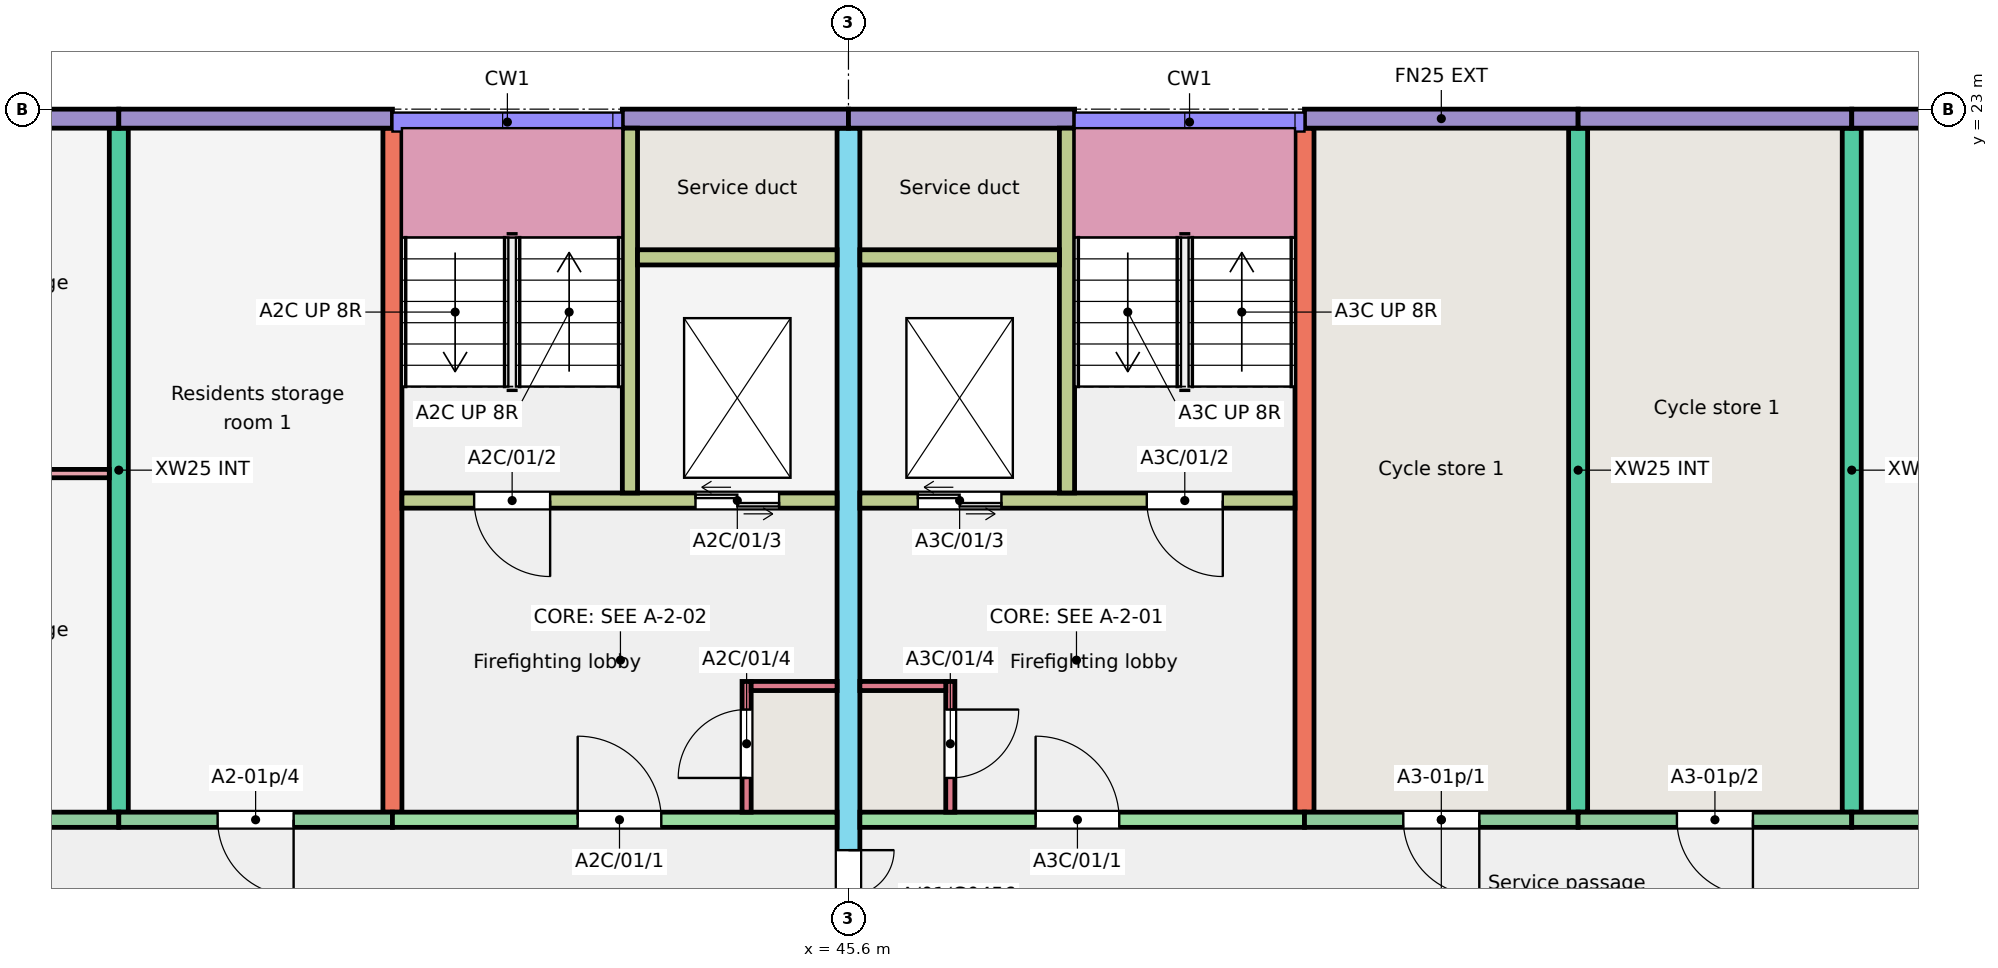
"""IFC4 building model, lengths in metres.
Left out: names, types, materials, properties, quantities, classifications, styles, units other than length and angle.
Written with IfcOpenShell. Run it as: python <this file> out.ifc"""

import sys

from ifc_helpers import new_model, si_unit, direction, frame, frame_2d, origin, place, context, subcontext, project, spatial, rectangle, extrude, element, fill, save


model = new_model("IFC4")
c1 = context("Model", 3, precision=1e-05, world=origin(), true_north=direction((0.0, 1.0)))
c2 = subcontext(c1, "Body", "Model", "MODEL_VIEW")
j1 = project(units=[si_unit("LENGTHUNIT", "METRE"), si_unit("PLANEANGLEUNIT", "RADIAN")], contexts=[c1])
p1 = place(None, origin())
s1 = spatial("IfcSite", under=j1, at=p1, CompositionType="ELEMENT")
p2 = place(p1, origin())
s2 = spatial("IfcBuilding", under=s1, at=p2, CompositionType="ELEMENT")
p3 = place(p2, frame((0.0, 0.0, 3.0)))
s3 = spatial("IfcBuildingStorey", under=s2, at=p3, CompositionType="ELEMENT", Elevation=3.0)
for number, where, z_axis, x_axis in (
    (1, (36.0, 13.75, 0.0), (0.0, 0.0, 1.0), (0.0, 1.0, 0.0)),
    (2, (39.6, 13.75, 0.0), (0.0, 0.0, 1.0), (0.0, 1.0, 0.0)),
):
    element("IfcWall", number, at=place(p3, frame(where, z_axis=z_axis, x_axis=x_axis)), inside=s3, PredefinedType="SHEAR", context=c2, shape_type="SweptSolid", body=[
        extrude(rectangle(XDim=9.0, YDim=0.25, at=frame_2d((4.5, 0.0))), origin(), (0.0, 0.0, 1.0), 3.0),
    ])
p4 = place(p3, frame((45.6, 11.75, 0.0), z_axis=(0.0, 0.0, 1.0), x_axis=(0.0, 1.0, 0.0)))
e3 = element("IfcWall", 3, at=p4, inside=s3, PredefinedType="SHEAR", context=c2, shape_type="SweptSolid", body=[
    extrude(rectangle(XDim=11.0, YDim=0.3, at=frame_2d((5.5, 0.0))), origin(), (0.0, 0.0, 1.0), 3.0),
])
p5 = place(p4, frame((0.3, 0.0, 0.0)))
e4 = element("IfcOpeningElement", 4, at=p5, cuts=e3, PredefinedType="OPENING", context=c2, shape_type="SweptSolid", body=[
    extrude(rectangle(XDim=1.2, YDim=2.1, at=frame_2d((0.6, 1.05))), frame((0.0, 0.16, 0.0), z_axis=(0.0, -1.0, 0.0), x_axis=(1.0, 0.0, 0.0)), (0.0, 0.0, 1.0), 0.32),
])
for number, where, z_axis, x_axis in (
    (5, (51.6, 13.75, 0.0), (0.0, 0.0, 1.0), (0.0, 1.0, 0.0)),
    (6, (55.2, 13.75, 0.0), (0.0, 0.0, 1.0), (0.0, 1.0, 0.0)),
    (7, (58.8, 13.75, 0.0), (0.0, 0.0, 1.0), (0.0, 1.0, 0.0)),
):
    element("IfcWall", number, at=place(p3, frame(where, z_axis=z_axis, x_axis=x_axis)), inside=s3, PredefinedType="SHEAR", context=c2, shape_type="SweptSolid", body=[
        extrude(rectangle(XDim=9.0, YDim=0.25, at=frame_2d((4.5, 0.0))), origin(), (0.0, 0.0, 1.0), 3.0),
    ])
p6 = place(p3, frame((32.4, 22.875, 0.0), z_axis=(0.0, 0.0, 1.0), x_axis=(1.0, 0.0, 0.0)))
e8 = element("IfcWall", 8, at=p6, inside=s3, PredefinedType="SOLIDWALL", context=c2, shape_type="SweptSolid", body=[
    extrude(rectangle(XDim=3.6, YDim=0.25, at=frame_2d((1.8, 0.0))), origin(), (0.0, 0.0, 1.0), 3.0),
])
p7 = place(p3, frame((32.4, 13.65, 0.0), z_axis=(0.0, 0.0, 1.0), x_axis=(1.0, 0.0, 0.0)))
e9 = element("IfcWall", 9, at=p7, inside=s3, PredefinedType="SOLIDWALL", context=c2, shape_type="SweptSolid", body=[
    extrude(rectangle(XDim=3.6, YDim=0.2, at=frame_2d((1.8, 0.0))), origin(), (0.0, 0.0, 1.0), 3.0),
])
p8 = place(p7, frame((1.3, 0.0, 0.0)))
e10 = element("IfcOpeningElement", 10, at=p8, cuts=e9, PredefinedType="OPENING", context=c2, shape_type="SweptSolid", body=[
    extrude(rectangle(XDim=1.0, YDim=2.1, at=frame_2d((0.5, 1.05))), frame((0.0, 0.11, 0.0), z_axis=(0.0, -1.0, 0.0), x_axis=(1.0, 0.0, 0.0)), (0.0, 0.0, 1.0), 0.22),
])
p9 = place(p3, frame((36.0, 22.875, 0.0), z_axis=(0.0, 0.0, 1.0), x_axis=(1.0, 0.0, 0.0)))
e11 = element("IfcWall", 11, at=p9, inside=s3, PredefinedType="SOLIDWALL", context=c2, shape_type="SweptSolid", body=[
    extrude(rectangle(XDim=3.6, YDim=0.25, at=frame_2d((1.8, 0.0))), origin(), (0.0, 0.0, 1.0), 3.0),
])
p10 = place(p3, frame((36.0, 13.65, 0.0), z_axis=(0.0, 0.0, 1.0), x_axis=(1.0, 0.0, 0.0)))
e12 = element("IfcWall", 12, at=p10, inside=s3, PredefinedType="SOLIDWALL", context=c2, shape_type="SweptSolid", body=[
    extrude(rectangle(XDim=3.6, YDim=0.2, at=frame_2d((1.8, 0.0))), origin(), (0.0, 0.0, 1.0), 3.0),
])
p11 = place(p10, frame((1.3, 0.0, 0.0)))
e13 = element("IfcOpeningElement", 13, at=p11, cuts=e12, PredefinedType="OPENING", context=c2, shape_type="SweptSolid", body=[
    extrude(rectangle(XDim=1.0, YDim=2.1, at=frame_2d((0.5, 1.05))), frame((0.0, 0.11, 0.0), z_axis=(0.0, -1.0, 0.0), x_axis=(1.0, 0.0, 0.0)), (0.0, 0.0, 1.0), 0.22),
])
p12 = place(p3, frame((42.625, 22.875, 0.0), z_axis=(0.0, 0.0, 1.0), x_axis=(1.0, 0.0, 0.0)))
e14 = element("IfcWall", 14, at=p12, inside=s3, PredefinedType="SOLIDWALL", context=c2, shape_type="SweptSolid", body=[
    extrude(rectangle(XDim=2.975, YDim=0.25, at=frame_2d((1.488, 0.0))), origin(), (0.0, 0.0, 1.0), 3.0),
])
p13 = place(p3, frame((39.6, 13.65, 0.0), z_axis=(0.0, 0.0, 1.0), x_axis=(1.0, 0.0, 0.0)))
e15 = element("IfcWall", 15, at=p13, inside=s3, PredefinedType="SHEAR", context=c2, shape_type="SweptSolid", body=[
    extrude(rectangle(XDim=5.85, YDim=0.2, at=frame_2d((2.925, 0.0))), origin(), (0.0, 0.0, 1.0), 3.0),
])
p14 = place(p13, frame((2.438, 0.0, 0.0)))
e16 = element("IfcOpeningElement", 16, at=p14, cuts=e15, PredefinedType="OPENING", context=c2, shape_type="SweptSolid", body=[
    extrude(rectangle(XDim=1.1, YDim=2.1, at=frame_2d((0.55, 1.05))), frame((0.0, 0.11, 0.0), z_axis=(0.0, -1.0, 0.0), x_axis=(1.0, 0.0, 0.0)), (0.0, 0.0, 1.0), 0.22),
])
p15 = place(p3, frame((39.725, 17.85, 0.0), z_axis=(0.0, 0.0, 1.0), x_axis=(1.0, 0.0, 0.0)))
e17 = element("IfcWall", 17, at=p15, inside=s3, PredefinedType="SHEAR", context=c2, shape_type="SweptSolid", body=[
    extrude(rectangle(XDim=5.725, YDim=0.2, at=frame_2d((2.862, 0.0))), origin(), (0.0, 0.0, 1.0), 3.0),
])
p16 = place(p15, frame((0.95, 0.0, 0.0)))
e18 = element("IfcOpeningElement", 18, at=p16, cuts=e17, PredefinedType="OPENING", context=c2, shape_type="SweptSolid", body=[
    extrude(rectangle(XDim=1.0, YDim=2.1, at=frame_2d((0.5, 1.05))), frame((0.0, 0.11, 0.0), z_axis=(0.0, -1.0, 0.0), x_axis=(1.0, 0.0, 0.0)), (0.0, 0.0, 1.0), 0.22),
])
p17 = place(p15, frame((3.863, 0.0, 0.0)))
e19 = element("IfcOpeningElement", 19, at=p17, cuts=e17, PredefinedType="OPENING", context=c2, shape_type="SweptSolid", body=[
    extrude(rectangle(XDim=1.1, YDim=2.1, at=frame_2d((0.55, 1.05))), frame((0.0, 0.11, 0.0), z_axis=(0.0, -1.0, 0.0), x_axis=(1.0, 0.0, 0.0)), (0.0, 0.0, 1.0), 0.22),
])
p18 = place(p3, frame((42.725, 17.95, 0.0), z_axis=(0.0, 0.0, 1.0), x_axis=(0.0, 1.0, 0.0)))
e20 = element("IfcWall", 20, at=p18, inside=s3, PredefinedType="SHEAR", context=c2, shape_type="SweptSolid", body=[
    extrude(rectangle(XDim=4.8, YDim=0.2, at=frame_2d((2.4, 0.0))), origin(), (0.0, 0.0, 1.0), 3.0),
])
p19 = place(p3, frame((42.825, 21.05, 0.0), z_axis=(0.0, 0.0, 1.0), x_axis=(1.0, 0.0, 0.0)))
e21 = element("IfcWall", 21, at=p19, inside=s3, PredefinedType="SHEAR", context=c2, shape_type="SweptSolid", body=[
    extrude(rectangle(XDim=2.625, YDim=0.2, at=frame_2d((1.312, 0.0))), origin(), (0.0, 0.0, 1.0), 3.0),
])
p20 = place(p3, frame((44.26, 13.75, 0.0), z_axis=(0.0, 0.0, 1.0), x_axis=(0.0, 1.0, 0.0)))
e22 = element("IfcWall", 22, at=p20, inside=s3, PredefinedType="SHEAR", context=c2, shape_type="SweptSolid", body=[
    extrude(rectangle(XDim=1.72, YDim=0.12, at=frame_2d((0.86, 0.0))), origin(), (0.0, 0.0, 1.0), 3.0),
])
p21 = place(p20, frame((0.45, 0.0, 0.0)))
e23 = element("IfcOpeningElement", 23, at=p21, cuts=e22, PredefinedType="OPENING", context=c2, shape_type="SweptSolid", body=[
    extrude(rectangle(XDim=0.9, YDim=2.1, at=frame_2d((0.45, 1.05))), frame((0.0, 0.07, 0.0), z_axis=(0.0, -1.0, 0.0), x_axis=(1.0, 0.0, 0.0)), (0.0, 0.0, 1.0), 0.14),
])
p22 = place(p3, frame((44.32, 15.41, 0.0), z_axis=(0.0, 0.0, 1.0), x_axis=(1.0, 0.0, 0.0)))
e24 = element("IfcWall", 24, at=p22, inside=s3, PredefinedType="SHEAR", context=c2, shape_type="SweptSolid", body=[
    extrude(rectangle(XDim=1.13, YDim=0.12, at=frame_2d((0.565, 0.0))), origin(), (0.0, 0.0, 1.0), 3.0),
])
p23 = place(p3, frame((45.6, 22.875, 0.0), z_axis=(0.0, 0.0, 1.0), x_axis=(1.0, 0.0, 0.0)))
e25 = element("IfcWall", 25, at=p23, inside=s3, PredefinedType="SOLIDWALL", context=c2, shape_type="SweptSolid", body=[
    extrude(rectangle(XDim=2.975, YDim=0.25, at=frame_2d((1.487, 0.0))), origin(), (0.0, 0.0, 1.0), 3.0),
])
p24 = place(p3, frame((45.75, 13.65, 0.0), z_axis=(0.0, 0.0, 1.0), x_axis=(1.0, 0.0, 0.0)))
e26 = element("IfcWall", 26, at=p24, inside=s3, PredefinedType="SHEAR", context=c2, shape_type="SweptSolid", body=[
    extrude(rectangle(XDim=5.85, YDim=0.2, at=frame_2d((2.925, 0.0))), origin(), (0.0, 0.0, 1.0), 3.0),
])
p25 = place(p24, frame((2.312, 0.0, 0.0)))
e27 = element("IfcOpeningElement", 27, at=p25, cuts=e26, PredefinedType="OPENING", context=c2, shape_type="SweptSolid", body=[
    extrude(rectangle(XDim=1.1, YDim=2.1, at=frame_2d((0.55, 1.05))), frame((0.0, 0.11, 0.0), z_axis=(0.0, -1.0, 0.0), x_axis=(1.0, 0.0, 0.0)), (0.0, 0.0, 1.0), 0.22),
])
p26 = place(p3, frame((45.75, 17.85, 0.0), z_axis=(0.0, 0.0, 1.0), x_axis=(1.0, 0.0, 0.0)))
e28 = element("IfcWall", 28, at=p26, inside=s3, PredefinedType="SHEAR", context=c2, shape_type="SweptSolid", body=[
    extrude(rectangle(XDim=5.725, YDim=0.2, at=frame_2d((2.863, 0.0))), origin(), (0.0, 0.0, 1.0), 3.0),
])
p27 = place(p26, frame((3.775, 0.0, 0.0)))
e29 = element("IfcOpeningElement", 29, at=p27, cuts=e28, PredefinedType="OPENING", context=c2, shape_type="SweptSolid", body=[
    extrude(rectangle(XDim=1.0, YDim=2.1, at=frame_2d((0.5, 1.05))), frame((0.0, 0.11, 0.0), z_axis=(0.0, -1.0, 0.0), x_axis=(1.0, 0.0, 0.0)), (0.0, 0.0, 1.0), 0.22),
])
p28 = place(p26, frame((0.762, 0.0, 0.0)))
e30 = element("IfcOpeningElement", 30, at=p28, cuts=e28, PredefinedType="OPENING", context=c2, shape_type="SweptSolid", body=[
    extrude(rectangle(XDim=1.1, YDim=2.1, at=frame_2d((0.55, 1.05))), frame((0.0, 0.11, 0.0), z_axis=(0.0, -1.0, 0.0), x_axis=(1.0, 0.0, 0.0)), (0.0, 0.0, 1.0), 0.22),
])
p29 = place(p3, frame((48.475, 17.95, 0.0), z_axis=(0.0, 0.0, 1.0), x_axis=(0.0, 1.0, 0.0)))
e31 = element("IfcWall", 31, at=p29, inside=s3, PredefinedType="SHEAR", context=c2, shape_type="SweptSolid", body=[
    extrude(rectangle(XDim=4.8, YDim=0.2, at=frame_2d((2.4, 0.0))), origin(), (0.0, 0.0, 1.0), 3.0),
])
p30 = place(p3, frame((45.75, 21.05, 0.0), z_axis=(0.0, 0.0, 1.0), x_axis=(1.0, 0.0, 0.0)))
e32 = element("IfcWall", 32, at=p30, inside=s3, PredefinedType="SHEAR", context=c2, shape_type="SweptSolid", body=[
    extrude(rectangle(XDim=2.625, YDim=0.2, at=frame_2d((1.312, 0.0))), origin(), (0.0, 0.0, 1.0), 3.0),
])
p31 = place(p3, frame((46.94, 13.75, 0.0), z_axis=(0.0, 0.0, 1.0), x_axis=(0.0, 1.0, 0.0)))
e33 = element("IfcWall", 33, at=p31, inside=s3, PredefinedType="SHEAR", context=c2, shape_type="SweptSolid", body=[
    extrude(rectangle(XDim=1.72, YDim=0.12, at=frame_2d((0.86, 0.0))), origin(), (0.0, 0.0, 1.0), 3.0),
])
p32 = place(p31, frame((0.45, 0.0, 0.0)))
e34 = element("IfcOpeningElement", 34, at=p32, cuts=e33, PredefinedType="OPENING", context=c2, shape_type="SweptSolid", body=[
    extrude(rectangle(XDim=0.9, YDim=2.1, at=frame_2d((0.45, 1.05))), frame((0.0, 0.07, 0.0), z_axis=(0.0, -1.0, 0.0), x_axis=(1.0, 0.0, 0.0)), (0.0, 0.0, 1.0), 0.14),
])
p33 = place(p3, frame((45.75, 15.41, 0.0), z_axis=(0.0, 0.0, 1.0), x_axis=(1.0, 0.0, 0.0)))
e35 = element("IfcWall", 35, at=p33, inside=s3, PredefinedType="SHEAR", context=c2, shape_type="SweptSolid", body=[
    extrude(rectangle(XDim=1.13, YDim=0.12, at=frame_2d((0.565, 0.0))), origin(), (0.0, 0.0, 1.0), 3.0),
])
p34 = place(p3, frame((51.6, 22.875, 0.0), z_axis=(0.0, 0.0, 1.0), x_axis=(1.0, 0.0, 0.0)))
e36 = element("IfcWall", 36, at=p34, inside=s3, PredefinedType="SOLIDWALL", context=c2, shape_type="SweptSolid", body=[
    extrude(rectangle(XDim=3.6, YDim=0.25, at=frame_2d((1.8, 0.0))), origin(), (0.0, 0.0, 1.0), 3.0),
])
p35 = place(p3, frame((51.6, 13.65, 0.0), z_axis=(0.0, 0.0, 1.0), x_axis=(1.0, 0.0, 0.0)))
e37 = element("IfcWall", 37, at=p35, inside=s3, PredefinedType="SOLIDWALL", context=c2, shape_type="SweptSolid", body=[
    extrude(rectangle(XDim=3.6, YDim=0.2, at=frame_2d((1.8, 0.0))), origin(), (0.0, 0.0, 1.0), 3.0),
])
p36 = place(p35, frame((1.3, 0.0, 0.0)))
e38 = element("IfcOpeningElement", 38, at=p36, cuts=e37, PredefinedType="OPENING", context=c2, shape_type="SweptSolid", body=[
    extrude(rectangle(XDim=1.0, YDim=2.1, at=frame_2d((0.5, 1.05))), frame((0.0, 0.11, 0.0), z_axis=(0.0, -1.0, 0.0), x_axis=(1.0, 0.0, 0.0)), (0.0, 0.0, 1.0), 0.22),
])
p37 = place(p3, frame((55.2, 22.875, 0.0), z_axis=(0.0, 0.0, 1.0), x_axis=(1.0, 0.0, 0.0)))
e39 = element("IfcWall", 39, at=p37, inside=s3, PredefinedType="SOLIDWALL", context=c2, shape_type="SweptSolid", body=[
    extrude(rectangle(XDim=3.6, YDim=0.25, at=frame_2d((1.8, 0.0))), origin(), (0.0, 0.0, 1.0), 3.0),
])
p38 = place(p3, frame((55.2, 13.65, 0.0), z_axis=(0.0, 0.0, 1.0), x_axis=(1.0, 0.0, 0.0)))
e40 = element("IfcWall", 40, at=p38, inside=s3, PredefinedType="SOLIDWALL", context=c2, shape_type="SweptSolid", body=[
    extrude(rectangle(XDim=3.6, YDim=0.2, at=frame_2d((1.8, 0.0))), origin(), (0.0, 0.0, 1.0), 3.0),
])
p39 = place(p38, frame((1.3, 0.0, 0.0)))
e41 = element("IfcOpeningElement", 41, at=p39, cuts=e40, PredefinedType="OPENING", context=c2, shape_type="SweptSolid", body=[
    extrude(rectangle(XDim=1.0, YDim=2.1, at=frame_2d((0.5, 1.05))), frame((0.0, 0.11, 0.0), z_axis=(0.0, -1.0, 0.0), x_axis=(1.0, 0.0, 0.0)), (0.0, 0.0, 1.0), 0.22),
])
p40 = place(p3, frame((58.8, 22.875, 0.0), z_axis=(0.0, 0.0, 1.0), x_axis=(1.0, 0.0, 0.0)))
e42 = element("IfcWall", 42, at=p40, inside=s3, PredefinedType="SOLIDWALL", context=c2, shape_type="SweptSolid", body=[
    extrude(rectangle(XDim=3.6, YDim=0.25, at=frame_2d((1.8, 0.0))), origin(), (0.0, 0.0, 1.0), 3.0),
])
p41 = place(p3, frame((58.8, 13.65, 0.0), z_axis=(0.0, 0.0, 1.0), x_axis=(1.0, 0.0, 0.0)))
e43 = element("IfcWall", 43, at=p41, inside=s3, PredefinedType="SOLIDWALL", context=c2, shape_type="SweptSolid", body=[
    extrude(rectangle(XDim=3.45, YDim=0.2, at=frame_2d((1.725, 0.0))), origin(), (0.0, 0.0, 1.0), 3.0),
])
p42 = place(p41, frame((1.288, 0.0, 0.0)))
e44 = element("IfcOpeningElement", 44, at=p42, cuts=e43, PredefinedType="OPENING", context=c2, shape_type="SweptSolid", body=[
    extrude(rectangle(XDim=1.0, YDim=2.1, at=frame_2d((0.5, 1.05))), frame((0.0, 0.11, 0.0), z_axis=(0.0, -1.0, 0.0), x_axis=(1.0, 0.0, 0.0)), (0.0, 0.0, 1.0), 0.22),
])
p43 = place(p3, frame((32.525, 18.205, 0.0), z_axis=(0.0, 0.0, 1.0), x_axis=(1.0, 0.0, 0.0)))
e45 = element("IfcWall", 45, at=p43, inside=s3, PredefinedType="PARTITIONING", context=c2, shape_type="SweptSolid", body=[
    extrude(rectangle(XDim=3.35, YDim=0.11, at=frame_2d((1.675, 0.0))), origin(), (0.0, 0.0, 1.0), 2.8),
])
p44 = place(p43, frame((1.225, 0.0, 0.0)))
e46 = element("IfcOpeningElement", 46, at=p44, cuts=e45, PredefinedType="OPENING", context=c2, shape_type="SweptSolid", body=[
    extrude(rectangle(XDim=0.9, YDim=2.1, at=frame_2d((0.45, 1.05))), frame((0.0, 0.065, 0.0), z_axis=(0.0, -1.0, 0.0), x_axis=(1.0, 0.0, 0.0)), (0.0, 0.0, 1.0), 0.13),
])
p45 = place(p11, origin())
e47 = element("IfcDoor", 47, at=p45, inside=s3, OperationType="SINGLE_SWING_RIGHT", PredefinedType="DOOR", context=c2, shape_type="SweptSolid", body=[
    extrude(rectangle(XDim=1.0, YDim=2.1, at=frame_2d((0.5, 1.05))), frame((0.0, 0.025, 0.0), z_axis=(0.0, -1.0, 0.0), x_axis=(1.0, 0.0, 0.0)), (0.0, 0.0, 1.0), 0.05),
])
fill(e13, e47)
p46 = place(p36, origin())
e48 = element("IfcDoor", 48, at=p46, inside=s3, OperationType="SINGLE_SWING_RIGHT", PredefinedType="DOOR", context=c2, shape_type="SweptSolid", body=[
    extrude(rectangle(XDim=1.0, YDim=2.1, at=frame_2d((0.5, 1.05))), frame((0.0, 0.025, 0.0), z_axis=(0.0, -1.0, 0.0), x_axis=(1.0, 0.0, 0.0)), (0.0, 0.0, 1.0), 0.05),
])
fill(e38, e48)
p47 = place(p39, origin())
e49 = element("IfcDoor", 49, at=p47, inside=s3, OperationType="SINGLE_SWING_RIGHT", PredefinedType="DOOR", context=c2, shape_type="SweptSolid", body=[
    extrude(rectangle(XDim=1.0, YDim=2.1, at=frame_2d((0.5, 1.05))), frame((0.0, 0.025, 0.0), z_axis=(0.0, -1.0, 0.0), x_axis=(1.0, 0.0, 0.0)), (0.0, 0.0, 1.0), 0.05),
])
fill(e41, e49)
p48 = place(p14, origin())
e50 = element("IfcDoor", 50, at=p48, inside=s3, OperationType="SINGLE_SWING_LEFT", PredefinedType="DOOR", context=c2, shape_type="SweptSolid", body=[
    extrude(rectangle(XDim=1.1, YDim=2.1, at=frame_2d((0.55, 1.05))), frame((0.0, 0.025, 0.0), z_axis=(0.0, -1.0, 0.0), x_axis=(1.0, 0.0, 0.0)), (0.0, 0.0, 1.0), 0.05),
])
fill(e16, e50)
p49 = place(p16, origin())
e51 = element("IfcDoor", 51, at=p49, inside=s3, OperationType="SINGLE_SWING_RIGHT", PredefinedType="DOOR", context=c2, shape_type="SweptSolid", body=[
    extrude(rectangle(XDim=1.0, YDim=2.1, at=frame_2d((0.5, 1.05))), frame((0.0, 0.025, 0.0), z_axis=(0.0, -1.0, 0.0), x_axis=(1.0, 0.0, 0.0)), (0.0, 0.0, 1.0), 0.05),
])
fill(e18, e51)
p50 = place(p17, origin())
e52 = element("IfcDoor", 52, at=p50, inside=s3, OperationType="DOUBLE_DOOR_SLIDING", PredefinedType="DOOR", context=c2, shape_type="SweptSolid", body=[
    extrude(rectangle(XDim=1.1, YDim=2.1, at=frame_2d((0.55, 1.05))), frame((0.0, 0.025, 0.0), z_axis=(0.0, -1.0, 0.0), x_axis=(1.0, 0.0, 0.0)), (0.0, 0.0, 1.0), 0.05),
])
fill(e19, e52)
p51 = place(p21, origin())
e53 = element("IfcDoor", 53, at=p51, inside=s3, OperationType="SINGLE_SWING_LEFT", PredefinedType="DOOR", context=c2, shape_type="SweptSolid", body=[
    extrude(rectangle(XDim=0.9, YDim=2.1, at=frame_2d((0.45, 1.05))), frame((0.0, 0.025, 0.0), z_axis=(0.0, -1.0, 0.0), x_axis=(1.0, 0.0, 0.0)), (0.0, 0.0, 1.0), 0.05),
])
fill(e23, e53)
p52 = place(p25, origin())
e54 = element("IfcDoor", 54, at=p52, inside=s3, OperationType="SINGLE_SWING_LEFT", PredefinedType="DOOR", context=c2, shape_type="SweptSolid", body=[
    extrude(rectangle(XDim=1.1, YDim=2.1, at=frame_2d((0.55, 1.05))), frame((0.0, 0.025, 0.0), z_axis=(0.0, -1.0, 0.0), x_axis=(1.0, 0.0, 0.0)), (0.0, 0.0, 1.0), 0.05),
])
fill(e27, e54)
p53 = place(p27, origin())
e55 = element("IfcDoor", 55, at=p53, inside=s3, OperationType="SINGLE_SWING_RIGHT", PredefinedType="DOOR", context=c2, shape_type="SweptSolid", body=[
    extrude(rectangle(XDim=1.0, YDim=2.1, at=frame_2d((0.5, 1.05))), frame((0.0, 0.025, 0.0), z_axis=(0.0, -1.0, 0.0), x_axis=(1.0, 0.0, 0.0)), (0.0, 0.0, 1.0), 0.05),
])
fill(e29, e55)
p54 = place(p28, origin())
e56 = element("IfcDoor", 56, at=p54, inside=s3, OperationType="DOUBLE_DOOR_SLIDING", PredefinedType="DOOR", context=c2, shape_type="SweptSolid", body=[
    extrude(rectangle(XDim=1.1, YDim=2.1, at=frame_2d((0.55, 1.05))), frame((0.0, 0.025, 0.0), z_axis=(0.0, -1.0, 0.0), x_axis=(1.0, 0.0, 0.0)), (0.0, 0.0, 1.0), 0.05),
])
fill(e30, e56)
p55 = place(p32, origin())
e57 = element("IfcDoor", 57, at=p55, inside=s3, OperationType="SINGLE_SWING_RIGHT", PredefinedType="DOOR", context=c2, shape_type="SweptSolid", body=[
    extrude(rectangle(XDim=0.9, YDim=2.1, at=frame_2d((0.45, 1.05))), frame((0.0, 0.025, 0.0), z_axis=(0.0, -1.0, 0.0), x_axis=(1.0, 0.0, 0.0)), (0.0, 0.0, 1.0), 0.05),
])
fill(e34, e57)
p56 = place(p5, origin())
e58 = element("IfcDoor", 58, at=p56, inside=s3, OperationType="DOUBLE_DOOR_SINGLE_SWING", PredefinedType="DOOR", context=c2, shape_type="SweptSolid", body=[
    extrude(rectangle(XDim=1.2, YDim=2.1, at=frame_2d((0.6, 1.05))), frame((0.0, 0.025, 0.0), z_axis=(0.0, -1.0, 0.0), x_axis=(1.0, 0.0, 0.0)), (0.0, 0.0, 1.0), 0.05),
])
fill(e4, e58)
save(model, sys.argv[1])
